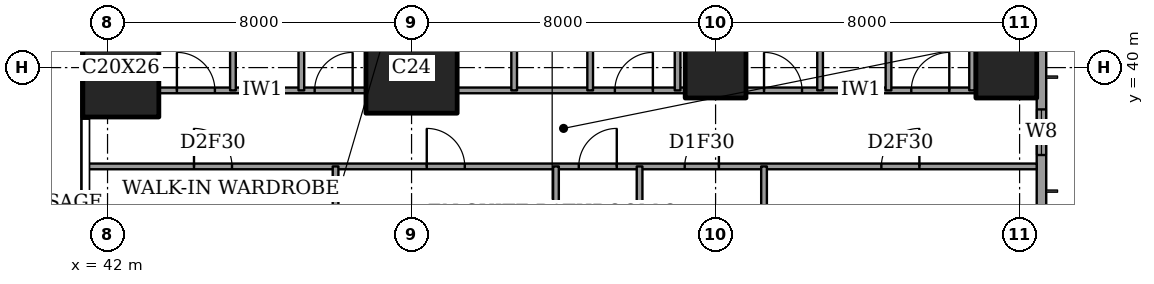
"""IFC4 building model, lengths in metres.
Left out: names, types, materials, properties, quantities, classifications, styles, units other than length and angle.
Written with IfcOpenShell. Run it as: python <this file> out.ifc"""

import sys

from ifc_helpers import new_model, si_unit, direction, frame, frame_2d, origin, origin_2d, place, context, subcontext, project, spatial, rectangle, extrude, element, fill, save


model = new_model("IFC4")
c1 = context("Model", 3, precision=1e-05, world=origin(), true_north=direction((0.0, 1.0)))
c2 = subcontext(c1, "Body", "Model", "MODEL_VIEW")
j1 = project(units=[si_unit("LENGTHUNIT", "METRE"), si_unit("PLANEANGLEUNIT", "RADIAN")], contexts=[c1])
p1 = place(None, origin())
s1 = spatial("IfcSite", under=j1, at=p1, CompositionType="ELEMENT")
p2 = place(p1, origin())
s2 = spatial("IfcBuilding", under=s1, at=p2, CompositionType="ELEMENT")
p3 = place(p2, frame((0.0, 0.0, 252.0)))
s3 = spatial("IfcBuildingStorey", under=s2, at=p3, CompositionType="ELEMENT", Elevation=252.0)
p4 = place(p3, frame((42.35, 40.0, 0.0), z_axis=(0.0, 0.0, 1.0), x_axis=(1.0, 0.0, 0.0)))
e1 = element("IfcColumn", 1, at=p4, inside=s3, PredefinedType="COLUMN", context=c2, shape_type="SweptSolid", body=[
    extrude(rectangle(XDim=2.0, YDim=2.6, at=origin_2d()), origin(), (0.0, 0.0, 1.0), 3.6),
])
p5 = place(p3, frame((50.0, 40.0, 0.0), z_axis=(0.0, 0.0, 1.0), x_axis=(1.0, 0.0, 0.0)))
e2 = element("IfcColumn", 2, at=p5, inside=s3, PredefinedType="COLUMN", context=c2, shape_type="SweptSolid", body=[
    extrude(rectangle(XDim=2.4, YDim=2.4, at=origin_2d()), origin(), (0.0, 0.0, 1.0), 3.6),
])
for number, where, z_axis, x_axis in (
    (3, (58.0, 40.0, 0.0), (0.0, 0.0, 1.0), (1.0, 0.0, 0.0)),
    (4, (65.65, 40.0, 0.0), (0.0, 0.0, 1.0), (1.0, 0.0, 0.0)),
):
    element("IfcColumn", number, at=place(p3, frame(where, z_axis=z_axis, x_axis=x_axis)), inside=s3, PredefinedType="COLUMN", context=c2, shape_type="SweptSolid", body=[
        extrude(rectangle(XDim=1.6, YDim=1.6, at=origin_2d()), origin(), (0.0, 0.0, 1.0), 3.6),
    ])
p6 = place(p3, frame((66.575, 3.175, 0.0), z_axis=(0.0, 0.0, 1.0), x_axis=(0.0, 1.0, 0.0)))
e5 = element("IfcWall", 5, at=p6, inside=s3, PredefinedType="SOLIDWALL", context=c2, shape_type="SweptSolid", body=[
    extrude(rectangle(XDim=41.65, YDim=0.25, at=frame_2d((20.825, 0.0))), origin(), (0.0, 0.0, 1.0), 3.6),
])
p7 = place(p6, frame((0.875, 0.0, 0.6)))
e6 = element("IfcOpeningElement", 6, at=p7, cuts=e5, PredefinedType="OPENING", context=c2, shape_type="SweptSolid", body=[
    extrude(rectangle(XDim=2.4, YDim=2.0, at=frame_2d((1.2, 1.0))), frame((0.0, 0.135, 0.0), z_axis=(0.0, -1.0, 0.0), x_axis=(1.0, 0.0, 0.0)), (0.0, 0.0, 1.0), 0.27),
])
p8 = place(p6, frame((6.6, 0.0, 0.6)))
e7 = element("IfcOpeningElement", 7, at=p8, cuts=e5, PredefinedType="OPENING", context=c2, shape_type="SweptSolid", body=[
    extrude(rectangle(XDim=1.2, YDim=2.0, at=frame_2d((0.6, 1.0))), frame((0.0, 0.135, 0.0), z_axis=(0.0, -1.0, 0.0), x_axis=(1.0, 0.0, 0.0)), (0.0, 0.0, 1.0), 0.27),
])
p9 = place(p6, frame((8.825, 0.0, 0.6)))
e8 = element("IfcOpeningElement", 8, at=p9, cuts=e5, PredefinedType="OPENING", context=c2, shape_type="SweptSolid", body=[
    extrude(rectangle(XDim=2.4, YDim=2.0, at=frame_2d((1.2, 1.0))), frame((0.0, 0.135, 0.0), z_axis=(0.0, -1.0, 0.0), x_axis=(1.0, 0.0, 0.0)), (0.0, 0.0, 1.0), 0.27),
])
p10 = place(p6, frame((15.725, 0.0, 0.6)))
e9 = element("IfcOpeningElement", 9, at=p10, cuts=e5, PredefinedType="OPENING", context=c2, shape_type="SweptSolid", body=[
    extrude(rectangle(XDim=2.4, YDim=2.0, at=frame_2d((1.2, 1.0))), frame((0.0, 0.135, 0.0), z_axis=(0.0, -1.0, 0.0), x_axis=(1.0, 0.0, 0.0)), (0.0, 0.0, 1.0), 0.27),
])
p11 = place(p6, frame((23.625, 0.0, 0.6)))
e10 = element("IfcOpeningElement", 10, at=p11, cuts=e5, PredefinedType="OPENING", context=c2, shape_type="SweptSolid", body=[
    extrude(rectangle(XDim=2.4, YDim=2.0, at=frame_2d((1.2, 1.0))), frame((0.0, 0.135, 0.0), z_axis=(0.0, -1.0, 0.0), x_axis=(1.0, 0.0, 0.0)), (0.0, 0.0, 1.0), 0.27),
])
p12 = place(p6, frame((30.725, 0.0, 0.6)))
e11 = element("IfcOpeningElement", 11, at=p12, cuts=e5, PredefinedType="OPENING", context=c2, shape_type="SweptSolid", body=[
    extrude(rectangle(XDim=2.4, YDim=2.0, at=frame_2d((1.2, 1.0))), frame((0.0, 0.135, 0.0), z_axis=(0.0, -1.0, 0.0), x_axis=(1.0, 0.0, 0.0)), (0.0, 0.0, 1.0), 0.27),
])
p13 = place(p6, frame((34.525, 0.0, 0.6)))
e12 = element("IfcOpeningElement", 12, at=p13, cuts=e5, PredefinedType="OPENING", context=c2, shape_type="SweptSolid", body=[
    extrude(rectangle(XDim=1.2, YDim=2.0, at=frame_2d((0.6, 1.0))), frame((0.0, 0.135, 0.0), z_axis=(0.0, -1.0, 0.0), x_axis=(1.0, 0.0, 0.0)), (0.0, 0.0, 1.0), 0.27),
])
p14 = place(p6, frame((38.375, 0.0, 0.6)))
e13 = element("IfcOpeningElement", 13, at=p14, cuts=e5, PredefinedType="OPENING", context=c2, shape_type="SweptSolid", body=[
    extrude(rectangle(XDim=2.4, YDim=2.0, at=frame_2d((1.2, 1.0))), frame((0.0, 0.135, 0.0), z_axis=(0.0, -1.0, 0.0), x_axis=(1.0, 0.0, 0.0)), (0.0, 0.0, 1.0), 0.27),
])
p15 = place(p3, frame((41.439, 37.4, 0.0), z_axis=(0.0, 0.0, 1.0), x_axis=(1.0, 0.0, 0.0)))
e14 = element("IfcWall", 14, at=p15, inside=s3, PredefinedType="PARTITIONING", context=c2, shape_type="SweptSolid", body=[
    extrude(rectangle(XDim=25.011, YDim=0.15, at=frame_2d((12.505, 0.0))), origin(), (0.0, 0.0, 1.0), 3.35),
])
p16 = place(p15, frame((12.961, 0.0, 0.0)))
e15 = element("IfcOpeningElement", 15, at=p16, cuts=e14, PredefinedType="OPENING", context=c2, shape_type="SweptSolid", body=[
    extrude(rectangle(XDim=1.0, YDim=2.1, at=frame_2d((0.5, 1.05))), frame((0.0, 0.085, 0.0), z_axis=(0.0, -1.0, 0.0), x_axis=(1.0, 0.0, 0.0)), (0.0, 0.0, 1.0), 0.17),
])
p17 = place(p15, frame((20.924, 0.0, 0.0)))
e16 = element("IfcOpeningElement", 16, at=p17, cuts=e14, PredefinedType="OPENING", context=c2, shape_type="SweptSolid", body=[
    extrude(rectangle(XDim=1.0, YDim=2.1, at=frame_2d((0.5, 1.05))), frame((0.0, 0.085, 0.0), z_axis=(0.0, -1.0, 0.0), x_axis=(1.0, 0.0, 0.0)), (0.0, 0.0, 1.0), 0.17),
])
p18 = place(p15, frame((15.749, 0.0, 0.0)))
e17 = element("IfcOpeningElement", 17, at=p18, cuts=e14, PredefinedType="OPENING", context=c2, shape_type="SweptSolid", body=[
    extrude(rectangle(XDim=0.9, YDim=2.1, at=frame_2d((0.45, 1.05))), frame((0.0, 0.085, 0.0), z_axis=(0.0, -1.0, 0.0), x_axis=(1.0, 0.0, 0.0)), (0.0, 0.0, 1.0), 0.17),
])
p19 = place(p15, frame((8.961, 0.0, 0.0)))
e18 = element("IfcOpeningElement", 18, at=p19, cuts=e14, PredefinedType="OPENING", context=c2, shape_type="SweptSolid", body=[
    extrude(rectangle(XDim=1.0, YDim=2.1, at=frame_2d((0.5, 1.05))), frame((0.0, 0.085, 0.0), z_axis=(0.0, -1.0, 0.0), x_axis=(1.0, 0.0, 0.0)), (0.0, 0.0, 1.0), 0.17),
])
p20 = place(p15, frame((2.836, 0.0, 0.0)))
e19 = element("IfcOpeningElement", 19, at=p20, cuts=e14, PredefinedType="OPENING", context=c2, shape_type="SweptSolid", body=[
    extrude(rectangle(XDim=1.0, YDim=2.1, at=frame_2d((0.5, 1.05))), frame((0.0, 0.085, 0.0), z_axis=(0.0, -1.0, 0.0), x_axis=(1.0, 0.0, 0.0)), (0.0, 0.0, 1.0), 0.17),
])
p21 = place(p3, frame((43.35, 39.4, 0.0), z_axis=(0.0, 0.0, 1.0), x_axis=(1.0, 0.0, 0.0)))
e20 = element("IfcWall", 20, at=p21, inside=s3, PredefinedType="PARTITIONING", context=c2, shape_type="SweptSolid", body=[
    extrude(rectangle(XDim=5.45, YDim=0.15, at=frame_2d((2.725, 0.0))), origin(), (0.0, 0.0, 1.0), 3.35),
])
p22 = place(p21, frame((4.1, 0.0, 0.0)))
e21 = element("IfcOpeningElement", 21, at=p22, cuts=e20, PredefinedType="OPENING", context=c2, shape_type="SweptSolid", body=[
    extrude(rectangle(XDim=1.0, YDim=2.1, at=frame_2d((0.5, 1.05))), frame((0.0, 0.085, 0.0), z_axis=(0.0, -1.0, 0.0), x_axis=(1.0, 0.0, 0.0)), (0.0, 0.0, 1.0), 0.17),
])
p23 = place(p21, frame((0.475, 0.0, 0.0)))
e22 = element("IfcOpeningElement", 22, at=p23, cuts=e20, PredefinedType="OPENING", context=c2, shape_type="SweptSolid", body=[
    extrude(rectangle(XDim=1.0, YDim=2.1, at=frame_2d((0.5, 1.05))), frame((0.0, 0.085, 0.0), z_axis=(0.0, -1.0, 0.0), x_axis=(1.0, 0.0, 0.0)), (0.0, 0.0, 1.0), 0.17),
])
p24 = place(p3, frame((51.2, 39.4, 0.0), z_axis=(0.0, 0.0, 1.0), x_axis=(1.0, 0.0, 0.0)))
e23 = element("IfcWall", 23, at=p24, inside=s3, PredefinedType="PARTITIONING", context=c2, shape_type="SweptSolid", body=[
    extrude(rectangle(XDim=6.0, YDim=0.15, at=frame_2d((3.0, 0.0))), origin(), (0.0, 0.0, 1.0), 3.35),
])
p25 = place(p24, frame((4.15, 0.0, 0.0)))
e24 = element("IfcOpeningElement", 24, at=p25, cuts=e23, PredefinedType="OPENING", context=c2, shape_type="SweptSolid", body=[
    extrude(rectangle(XDim=1.0, YDim=2.1, at=frame_2d((0.5, 1.05))), frame((0.0, 0.085, 0.0), z_axis=(0.0, -1.0, 0.0), x_axis=(1.0, 0.0, 0.0)), (0.0, 0.0, 1.0), 0.17),
])
p26 = place(p3, frame((58.8, 39.4, 0.0), z_axis=(0.0, 0.0, 1.0), x_axis=(1.0, 0.0, 0.0)))
e25 = element("IfcWall", 25, at=p26, inside=s3, PredefinedType="PARTITIONING", context=c2, shape_type="SweptSolid", body=[
    extrude(rectangle(XDim=6.05, YDim=0.15, at=frame_2d((3.025, 0.0))), origin(), (0.0, 0.0, 1.0), 3.35),
])
p27 = place(p26, frame((4.35, 0.0, 0.0)))
e26 = element("IfcOpeningElement", 26, at=p27, cuts=e25, PredefinedType="OPENING", context=c2, shape_type="SweptSolid", body=[
    extrude(rectangle(XDim=1.0, YDim=2.1, at=frame_2d((0.5, 1.05))), frame((0.0, 0.085, 0.0), z_axis=(0.0, -1.0, 0.0), x_axis=(1.0, 0.0, 0.0)), (0.0, 0.0, 1.0), 0.17),
])
p28 = place(p26, frame((0.475, 0.0, 0.0)))
e27 = element("IfcOpeningElement", 27, at=p28, cuts=e25, PredefinedType="OPENING", context=c2, shape_type="SweptSolid", body=[
    extrude(rectangle(XDim=1.0, YDim=2.1, at=frame_2d((0.5, 1.05))), frame((0.0, 0.085, 0.0), z_axis=(0.0, -1.0, 0.0), x_axis=(1.0, 0.0, 0.0)), (0.0, 0.0, 1.0), 0.17),
])
p29 = place(p3, frame((45.3, 39.4, 0.0), z_axis=(0.0, 0.0, 1.0), x_axis=(0.0, 1.0, 0.0)))
e28 = element("IfcWall", 28, at=p29, inside=s3, PredefinedType="PARTITIONING", context=c2, shape_type="SweptSolid", body=[
    extrude(rectangle(XDim=9.05, YDim=0.15, at=frame_2d((4.525, 0.0))), origin(), (0.0, 0.0, 1.0), 3.35),
])
p30 = place(p3, frame((47.1, 39.4, 0.0), z_axis=(0.0, 0.0, 1.0), x_axis=(0.0, 1.0, 0.0)))
e29 = element("IfcWall", 29, at=p30, inside=s3, PredefinedType="PARTITIONING", context=c2, shape_type="SweptSolid", body=[
    extrude(rectangle(XDim=3.5, YDim=0.15, at=frame_2d((1.75, 0.0))), origin(), (0.0, 0.0, 1.0), 3.35),
])
p31 = place(p30, frame((1.3, 0.0, 0.0)))
e30 = element("IfcOpeningElement", 30, at=p31, cuts=e29, PredefinedType="OPENING", context=c2, shape_type="SweptSolid", body=[
    extrude(rectangle(XDim=0.9, YDim=2.1, at=frame_2d((0.45, 1.05))), frame((0.0, 0.085, 0.0), z_axis=(0.0, -1.0, 0.0), x_axis=(1.0, 0.0, 0.0)), (0.0, 0.0, 1.0), 0.17),
])
p32 = place(p3, frame((48.0, 28.0, 0.0), z_axis=(0.0, 0.0, 1.0), x_axis=(0.0, 1.0, 0.0)))
e31 = element("IfcWall", 31, at=p32, inside=s3, PredefinedType="PARTITIONING", context=c2, shape_type="SweptSolid", body=[
    extrude(rectangle(XDim=9.4, YDim=0.15, at=frame_2d((4.7, 0.0))), origin(), (0.0, 0.0, 1.0), 3.35),
])
p33 = place(p32, frame((0.837, 0.0, 0.0)))
e32 = element("IfcOpeningElement", 32, at=p33, cuts=e31, PredefinedType="OPENING", context=c2, shape_type="SweptSolid", body=[
    extrude(rectangle(XDim=1.0, YDim=2.1, at=frame_2d((0.5, 1.05))), frame((0.0, 0.085, 0.0), z_axis=(0.0, -1.0, 0.0), x_axis=(1.0, 0.0, 0.0)), (0.0, 0.0, 1.0), 0.17),
])
p34 = place(p3, frame((52.7, 39.4, 0.0), z_axis=(0.0, 0.0, 1.0), x_axis=(0.0, 1.0, 0.0)))
e33 = element("IfcWall", 33, at=p34, inside=s3, PredefinedType="PARTITIONING", context=c2, shape_type="SweptSolid", body=[
    extrude(rectangle(XDim=9.05, YDim=0.15, at=frame_2d((4.525, 0.0))), origin(), (0.0, 0.0, 1.0), 3.35),
])
p35 = place(p34, frame((5.675, 0.0, 0.0)))
e34 = element("IfcOpeningElement", 34, at=p35, cuts=e33, PredefinedType="OPENING", context=c2, shape_type="SweptSolid", body=[
    extrude(rectangle(XDim=0.9, YDim=2.1, at=frame_2d((0.45, 1.05))), frame((0.0, 0.085, 0.0), z_axis=(0.0, -1.0, 0.0), x_axis=(1.0, 0.0, 0.0)), (0.0, 0.0, 1.0), 0.17),
])
p36 = place(p3, frame((53.8, 30.675, 0.0), z_axis=(0.0, 0.0, 1.0), x_axis=(0.0, 1.0, 0.0)))
e35 = element("IfcWall", 35, at=p36, inside=s3, PredefinedType="PARTITIONING", context=c2, shape_type="SweptSolid", body=[
    extrude(rectangle(XDim=6.725, YDim=0.15, at=frame_2d((3.362, 0.0))), origin(), (0.0, 0.0, 1.0), 3.35),
])
p37 = place(p3, frame((54.7, 39.4, 0.0), z_axis=(0.0, 0.0, 1.0), x_axis=(0.0, 1.0, 0.0)))
e36 = element("IfcWall", 36, at=p37, inside=s3, PredefinedType="PARTITIONING", context=c2, shape_type="SweptSolid", body=[
    extrude(rectangle(XDim=3.2, YDim=0.15, at=frame_2d((1.6, 0.0))), origin(), (0.0, 0.0, 1.0), 3.35),
])
p38 = place(p37, frame((1.15, 0.0, 0.0)))
e37 = element("IfcOpeningElement", 37, at=p38, cuts=e36, PredefinedType="OPENING", context=c2, shape_type="SweptSolid", body=[
    extrude(rectangle(XDim=0.9, YDim=2.1, at=frame_2d((0.45, 1.05))), frame((0.0, 0.085, 0.0), z_axis=(0.0, -1.0, 0.0), x_axis=(1.0, 0.0, 0.0)), (0.0, 0.0, 1.0), 0.17),
])
p39 = place(p3, frame((56.0, 28.0, 0.0), z_axis=(0.0, 0.0, 1.0), x_axis=(0.0, 1.0, 0.0)))
e38 = element("IfcWall", 38, at=p39, inside=s3, PredefinedType="PARTITIONING", context=c2, shape_type="SweptSolid", body=[
    extrude(rectangle(XDim=9.4, YDim=0.15, at=frame_2d((4.7, 0.0))), origin(), (0.0, 0.0, 1.0), 3.35),
])
p40 = place(p39, frame((0.837, 0.0, 0.0)))
e39 = element("IfcOpeningElement", 39, at=p40, cuts=e38, PredefinedType="OPENING", context=c2, shape_type="SweptSolid", body=[
    extrude(rectangle(XDim=1.0, YDim=2.1, at=frame_2d((0.5, 1.05))), frame((0.0, 0.085, 0.0), z_axis=(0.0, -1.0, 0.0), x_axis=(1.0, 0.0, 0.0)), (0.0, 0.0, 1.0), 0.17),
])
p41 = place(p3, frame((57.0, 39.4, 0.0), z_axis=(0.0, 0.0, 1.0), x_axis=(0.0, 1.0, 0.0)))
e40 = element("IfcWall", 40, at=p41, inside=s3, PredefinedType="PARTITIONING", context=c2, shape_type="SweptSolid", body=[
    extrude(rectangle(XDim=9.05, YDim=0.15, at=frame_2d((4.525, 0.0))), origin(), (0.0, 0.0, 1.0), 3.35),
])
p42 = place(p3, frame((59.275, 33.2, 0.0), z_axis=(0.0, 0.0, 1.0), x_axis=(0.0, 1.0, 0.0)))
e41 = element("IfcWall", 41, at=p42, inside=s3, PredefinedType="PARTITIONING", context=c2, shape_type="SweptSolid", body=[
    extrude(rectangle(XDim=4.2, YDim=0.15, at=frame_2d((2.1, 0.0))), origin(), (0.0, 0.0, 1.0), 3.35),
])
p43 = place(p3, frame((60.75, 39.4, 0.0), z_axis=(0.0, 0.0, 1.0), x_axis=(0.0, 1.0, 0.0)))
e42 = element("IfcWall", 42, at=p43, inside=s3, PredefinedType="PARTITIONING", context=c2, shape_type="SweptSolid", body=[
    extrude(rectangle(XDim=9.05, YDim=0.15, at=frame_2d((4.525, 0.0))), origin(), (0.0, 0.0, 1.0), 3.35),
])
p44 = place(p3, frame((62.55, 39.4, 0.0), z_axis=(0.0, 0.0, 1.0), x_axis=(0.0, 1.0, 0.0)))
e43 = element("IfcWall", 43, at=p44, inside=s3, PredefinedType="PARTITIONING", context=c2, shape_type="SweptSolid", body=[
    extrude(rectangle(XDim=3.5, YDim=0.15, at=frame_2d((1.75, 0.0))), origin(), (0.0, 0.0, 1.0), 3.35),
])
p45 = place(p44, frame((1.3, 0.0, 0.0)))
e44 = element("IfcOpeningElement", 44, at=p45, cuts=e43, PredefinedType="OPENING", context=c2, shape_type="SweptSolid", body=[
    extrude(rectangle(XDim=0.9, YDim=2.1, at=frame_2d((0.45, 1.05))), frame((0.0, 0.085, 0.0), z_axis=(0.0, -1.0, 0.0), x_axis=(1.0, 0.0, 0.0)), (0.0, 0.0, 1.0), 0.17),
])
p46 = place(p3, frame((64.75, 39.4, 0.0), z_axis=(0.0, 0.0, 1.0), x_axis=(0.0, 1.0, 0.0)))
e45 = element("IfcWall", 45, at=p46, inside=s3, PredefinedType="PARTITIONING", context=c2, shape_type="SweptSolid", body=[
    extrude(rectangle(XDim=5.3, YDim=0.15, at=frame_2d((2.65, 0.0))), origin(), (0.0, 0.0, 1.0), 3.35),
])
p47 = place(p46, frame((2.2, 0.0, 0.0)))
e46 = element("IfcOpeningElement", 46, at=p47, cuts=e45, PredefinedType="OPENING", context=c2, shape_type="SweptSolid", body=[
    extrude(rectangle(XDim=0.9, YDim=2.1, at=frame_2d((0.45, 1.05))), frame((0.0, 0.085, 0.0), z_axis=(0.0, -1.0, 0.0), x_axis=(1.0, 0.0, 0.0)), (0.0, 0.0, 1.0), 0.17),
])
p48 = place(p13, origin())
e47 = element("IfcWindow", 47, at=p48, inside=s3, PartitioningType="SINGLE_PANEL", PredefinedType="WINDOW", context=c2, shape_type="SweptSolid", body=[
    extrude(rectangle(XDim=1.2, YDim=2.0, at=frame_2d((0.6, 1.0))), frame((0.0, 0.03, 0.0), z_axis=(0.0, -1.0, 0.0), x_axis=(1.0, 0.0, 0.0)), (0.0, 0.0, 1.0), 0.06),
])
fill(e12, e47)
p49 = place(p27, origin())
e48 = element("IfcDoor", 48, at=p49, inside=s3, OperationType="SINGLE_SWING_LEFT", PredefinedType="DOOR", context=c2, shape_type="SweptSolid", body=[
    extrude(rectangle(XDim=1.0, YDim=2.1, at=frame_2d((0.5, 1.05))), frame((0.0, 0.025, 0.0), z_axis=(0.0, -1.0, 0.0), x_axis=(1.0, 0.0, 0.0)), (0.0, 0.0, 1.0), 0.05),
])
fill(e26, e48)
p50 = place(p28, origin())
e49 = element("IfcDoor", 49, at=p50, inside=s3, OperationType="SINGLE_SWING_RIGHT", PredefinedType="DOOR", context=c2, shape_type="SweptSolid", body=[
    extrude(rectangle(XDim=1.0, YDim=2.1, at=frame_2d((0.5, 1.05))), frame((0.0, 0.025, 0.0), z_axis=(0.0, -1.0, 0.0), x_axis=(1.0, 0.0, 0.0)), (0.0, 0.0, 1.0), 0.05),
])
fill(e27, e49)
p51 = place(p25, origin())
e50 = element("IfcDoor", 50, at=p51, inside=s3, OperationType="SINGLE_SWING_LEFT", PredefinedType="DOOR", context=c2, shape_type="SweptSolid", body=[
    extrude(rectangle(XDim=1.0, YDim=2.1, at=frame_2d((0.5, 1.05))), frame((0.0, 0.025, 0.0), z_axis=(0.0, -1.0, 0.0), x_axis=(1.0, 0.0, 0.0)), (0.0, 0.0, 1.0), 0.05),
])
fill(e24, e50)
p52 = place(p22, origin())
e51 = element("IfcDoor", 51, at=p52, inside=s3, OperationType="SINGLE_SWING_LEFT", PredefinedType="DOOR", context=c2, shape_type="SweptSolid", body=[
    extrude(rectangle(XDim=1.0, YDim=2.1, at=frame_2d((0.5, 1.05))), frame((0.0, 0.025, 0.0), z_axis=(0.0, -1.0, 0.0), x_axis=(1.0, 0.0, 0.0)), (0.0, 0.0, 1.0), 0.05),
])
fill(e21, e51)
p53 = place(p23, origin())
e52 = element("IfcDoor", 52, at=p53, inside=s3, OperationType="SINGLE_SWING_RIGHT", PredefinedType="DOOR", context=c2, shape_type="SweptSolid", body=[
    extrude(rectangle(XDim=1.0, YDim=2.1, at=frame_2d((0.5, 1.05))), frame((0.0, 0.025, 0.0), z_axis=(0.0, -1.0, 0.0), x_axis=(1.0, 0.0, 0.0)), (0.0, 0.0, 1.0), 0.05),
])
fill(e22, e52)
p54 = place(p16, origin())
e53 = element("IfcDoor", 53, at=p54, inside=s3, OperationType="SINGLE_SWING_LEFT", PredefinedType="DOOR", context=c2, shape_type="SweptSolid", body=[
    extrude(rectangle(XDim=1.0, YDim=2.1, at=frame_2d((0.5, 1.05))), frame((0.0, 0.025, 0.0), z_axis=(0.0, -1.0, 0.0), x_axis=(1.0, 0.0, 0.0)), (0.0, 0.0, 1.0), 0.05),
])
fill(e15, e53)
p55 = place(p17, origin())
e54 = element("IfcDoor", 54, at=p55, inside=s3, OperationType="SINGLE_SWING_LEFT", PredefinedType="DOOR", context=c2, shape_type="SweptSolid", body=[
    extrude(rectangle(XDim=1.0, YDim=2.1, at=frame_2d((0.5, 1.05))), frame((0.0, 0.025, 0.0), z_axis=(0.0, -1.0, 0.0), x_axis=(1.0, 0.0, 0.0)), (0.0, 0.0, 1.0), 0.05),
])
fill(e16, e54)
p56 = place(p18, origin())
e55 = element("IfcDoor", 55, at=p56, inside=s3, OperationType="SINGLE_SWING_LEFT", PredefinedType="DOOR", context=c2, shape_type="SweptSolid", body=[
    extrude(rectangle(XDim=0.9, YDim=2.1, at=frame_2d((0.45, 1.05))), frame((0.0, 0.025, 0.0), z_axis=(0.0, -1.0, 0.0), x_axis=(1.0, 0.0, 0.0)), (0.0, 0.0, 1.0), 0.05),
])
fill(e17, e55)
p57 = place(p19, origin())
e56 = element("IfcDoor", 56, at=p57, inside=s3, OperationType="SINGLE_SWING_RIGHT", PredefinedType="DOOR", context=c2, shape_type="SweptSolid", body=[
    extrude(rectangle(XDim=1.0, YDim=2.1, at=frame_2d((0.5, 1.05))), frame((0.0, 0.025, 0.0), z_axis=(0.0, -1.0, 0.0), x_axis=(1.0, 0.0, 0.0)), (0.0, 0.0, 1.0), 0.05),
])
fill(e18, e56)
p58 = place(p20, origin())
e57 = element("IfcDoor", 57, at=p58, inside=s3, OperationType="SINGLE_SWING_RIGHT", PredefinedType="DOOR", context=c2, shape_type="SweptSolid", body=[
    extrude(rectangle(XDim=1.0, YDim=2.1, at=frame_2d((0.5, 1.05))), frame((0.0, 0.025, 0.0), z_axis=(0.0, -1.0, 0.0), x_axis=(1.0, 0.0, 0.0)), (0.0, 0.0, 1.0), 0.05),
])
fill(e19, e57)
save(model, sys.argv[1])
